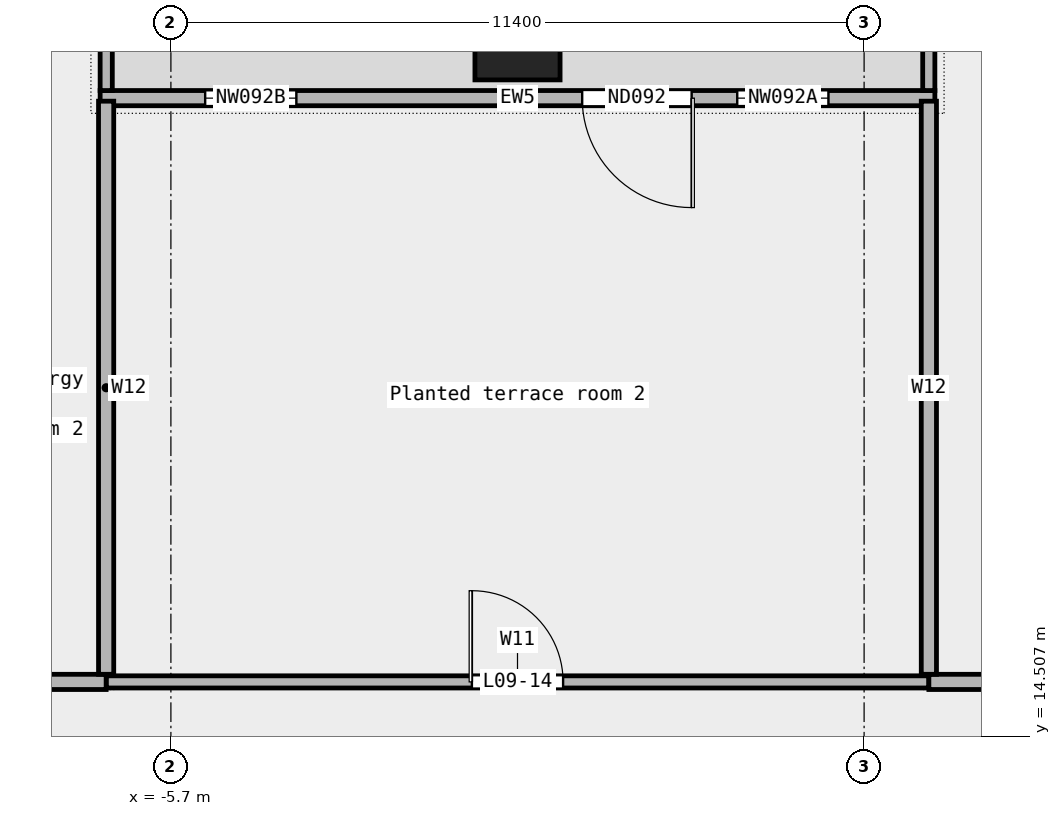
"""IFC4 building model, lengths in metres.
Left out: names, types, materials, properties, quantities, classifications, styles, units other than length and angle.
Written with IfcOpenShell. Run it as: python <this file> out.ifc"""

import sys

from ifc_helpers import new_model, si_unit, direction, frame, frame_2d, origin, origin_2d, place, context, subcontext, project, spatial, rectangle, extrude, element, fill, save


model = new_model("IFC4")
c1 = context("Model", 3, precision=1e-05, world=origin(), true_north=direction((0.0, 1.0)))
c2 = subcontext(c1, "Body", "Model", "MODEL_VIEW")
j1 = project(units=[si_unit("LENGTHUNIT", "METRE"), si_unit("PLANEANGLEUNIT", "RADIAN")], contexts=[c1])
p1 = place(None, origin())
s1 = spatial("IfcSite", under=j1, at=p1, CompositionType="ELEMENT")
p2 = place(p1, origin())
s2 = spatial("IfcBuilding", under=s1, at=p2, CompositionType="ELEMENT")
p3 = place(p2, frame((0.0, 0.0, 50.2)))
s3 = spatial("IfcBuildingStorey", under=s2, at=p3, CompositionType="ELEMENT", Elevation=50.2)
p4 = place(p3, frame((0.0, 26.0, 0.0), z_axis=(0.0, 0.0, 1.0), x_axis=(1.0, 0.0, 0.0)))
e1 = element("IfcColumn", 1, at=p4, inside=s3, PredefinedType="COLUMN", context=c2, shape_type="SweptSolid", body=[
    extrude(rectangle(XDim=1.4, YDim=1.4, at=origin_2d()), origin(), (0.0, 0.0, 1.0), 4.35),
])
p5 = place(p3, frame((6.864, 25.0, 0.0), z_axis=(0.0, 0.0, 1.0), x_axis=(-1.0, 0.0, 0.0)))
e2 = element("IfcWall", 2, at=p5, inside=s3, PredefinedType="STANDARD", context=c2, shape_type="SweptSolid", body=[
    extrude(rectangle(XDim=13.727, YDim=0.25, at=frame_2d((6.864, 0.0))), origin(), (0.0, 0.0, 1.0), 4.35),
])
p6 = place(p5, frame((1.75, 0.0, 0.45)))
e3 = element("IfcOpeningElement", 3, at=p6, cuts=e2, PredefinedType="OPENING", context=c2, shape_type="SweptSolid", body=[
    extrude(rectangle(XDim=1.5, YDim=3.0, at=frame_2d((0.75, 1.5))), frame((0.0, 0.137, 0.0), z_axis=(0.0, -1.0, 0.0), x_axis=(1.0, 0.0, 0.0)), (0.0, 0.0, 1.0), 0.274),
])
p7 = place(p5, frame((4.0, 0.0, 0.0)))
e4 = element("IfcOpeningElement", 4, at=p7, cuts=e2, PredefinedType="OPENING", context=c2, shape_type="SweptSolid", body=[
    extrude(rectangle(XDim=1.8, YDim=2.4, at=frame_2d((0.9, 1.2))), frame((0.0, 0.137, 0.0), z_axis=(0.0, -1.0, 0.0), x_axis=(1.0, 0.0, 0.0)), (0.0, 0.0, 1.0), 0.274),
])
p8 = place(p5, frame((10.5, 0.0, 0.45)))
e5 = element("IfcOpeningElement", 5, at=p8, cuts=e2, PredefinedType="OPENING", context=c2, shape_type="SweptSolid", body=[
    extrude(rectangle(XDim=1.5, YDim=3.0, at=frame_2d((0.75, 1.5))), frame((0.0, 0.137, 0.0), z_axis=(0.0, -1.0, 0.0), x_axis=(1.0, 0.0, 0.0)), (0.0, 0.0, 1.0), 0.274),
])
for number, where, z_axis, x_axis in (
    (6, (6.764, 27.0, 0.0), (0.0, 0.0, 1.0), (0.0, -1.0, 0.0)),
    (7, (-6.764, 27.0, 0.0), (0.0, 0.0, 1.0), (0.0, -1.0, 0.0)),
):
    element("IfcWall", number, at=place(p3, frame(where, z_axis=z_axis, x_axis=x_axis)), inside=s3, PredefinedType="STANDARD", context=c2, shape_type="SweptSolid", body=[
        extrude(rectangle(XDim=1.875, YDim=0.2, at=frame_2d((0.938, 0.0))), origin(), (0.0, 0.0, 1.0), 4.35),
    ])
p9 = place(p3, frame((-6.765, 15.4, 0.0), z_axis=(0.0, 0.0, 1.0), x_axis=(1.0, 0.0, 0.0)))
e8 = element("IfcWall", 8, at=p9, inside=s3, PredefinedType="PARTITIONING", context=c2, shape_type="SweptSolid", body=[
    extrude(rectangle(XDim=13.53, YDim=0.2, at=frame_2d((6.765, 0.0))), origin(), (0.0, 0.0, 1.0), 4.35),
])
p10 = place(p9, frame((6.015, 0.0, 0.0)))
e9 = element("IfcOpeningElement", 9, at=p10, cuts=e8, PredefinedType="OPENING", context=c2, shape_type="SweptSolid", body=[
    extrude(rectangle(XDim=1.5, YDim=2.1, at=frame_2d((0.75, 1.05))), frame((0.0, 0.112, 0.0), z_axis=(0.0, -1.0, 0.0), x_axis=(1.0, 0.0, 0.0)), (0.0, 0.0, 1.0), 0.224),
])
p11 = place(p3, frame((-10.185, 15.4, 0.0), z_axis=(0.0, 0.0, 1.0), x_axis=(1.0, 0.0, 0.0)))
e10 = element("IfcWall", 10, at=p11, inside=s3, PredefinedType="PARTITIONING", context=c2, shape_type="SweptSolid", body=[
    extrude(rectangle(XDim=3.42, YDim=0.25, at=frame_2d((1.71, 0.0))), origin(), (0.0, 0.0, 1.0), 4.35),
])
p12 = place(p11, frame((1.26, 0.0, 0.0)))
e11 = element("IfcOpeningElement", 11, at=p12, cuts=e10, PredefinedType="OPENING", context=c2, shape_type="SweptSolid", body=[
    extrude(rectangle(XDim=0.9, YDim=2.1, at=frame_2d((0.45, 1.05))), frame((0.0, 0.137, 0.0), z_axis=(0.0, -1.0, 0.0), x_axis=(1.0, 0.0, 0.0)), (0.0, 0.0, 1.0), 0.274),
])
p13 = place(p3, frame((6.765, 15.4, 0.0), z_axis=(0.0, 0.0, 1.0), x_axis=(1.0, 0.0, 0.0)))
e12 = element("IfcWall", 12, at=p13, inside=s3, PredefinedType="PARTITIONING", context=c2, shape_type="SweptSolid", body=[
    extrude(rectangle(XDim=9.535, YDim=0.25, at=frame_2d((4.768, 0.0))), origin(), (0.0, 0.0, 1.0), 4.35),
])
p14 = place(p13, frame((3.867, 0.0, 0.0)))
e13 = element("IfcOpeningElement", 13, at=p14, cuts=e12, PredefinedType="OPENING", context=c2, shape_type="SweptSolid", body=[
    extrude(rectangle(XDim=1.8, YDim=2.1, at=frame_2d((0.9, 1.05))), frame((0.0, 0.137, 0.0), z_axis=(0.0, -1.0, 0.0), x_axis=(1.0, 0.0, 0.0)), (0.0, 0.0, 1.0), 0.274),
])
for number, where, z_axis, x_axis in (
    (14, (-6.765, 15.525, 0.0), (0.0, 0.0, 1.0), (0.0, 1.0, 0.0)),
    (15, (6.765, 15.525, 0.0), (0.0, 0.0, 1.0), (0.0, 1.0, 0.0)),
):
    element("IfcWall", number, at=place(p3, frame(where, z_axis=z_axis, x_axis=x_axis)), inside=s3, PredefinedType="PARTITIONING", context=c2, shape_type="SweptSolid", body=[
        extrude(rectangle(XDim=9.425, YDim=0.25, at=frame_2d((4.712, 0.0))), origin(), (0.0, 0.0, 1.0), 4.35),
    ])
p15 = place(p6, origin())
e16 = element("IfcWindow", 16, at=p15, inside=s3, PartitioningType="SINGLE_PANEL", PredefinedType="WINDOW", context=c2, shape_type="SweptSolid", body=[
    extrude(rectangle(XDim=1.5, YDim=3.0, at=frame_2d((0.75, 1.5))), frame((0.0, 0.03, 0.0), z_axis=(0.0, -1.0, 0.0), x_axis=(1.0, 0.0, 0.0)), (0.0, 0.0, 1.0), 0.06),
])
fill(e3, e16)
p16 = place(p7, origin())
e17 = element("IfcDoor", 17, at=p16, inside=s3, OperationType="DOUBLE_DOOR_SINGLE_SWING", PredefinedType="DOOR", context=c2, shape_type="SweptSolid", body=[
    extrude(rectangle(XDim=1.8, YDim=2.4, at=frame_2d((0.9, 1.2))), frame((0.0, 0.025, 0.0), z_axis=(0.0, -1.0, 0.0), x_axis=(1.0, 0.0, 0.0)), (0.0, 0.0, 1.0), 0.05),
])
fill(e4, e17)
p17 = place(p8, origin())
e18 = element("IfcWindow", 18, at=p17, inside=s3, PartitioningType="SINGLE_PANEL", PredefinedType="WINDOW", context=c2, shape_type="SweptSolid", body=[
    extrude(rectangle(XDim=1.5, YDim=3.0, at=frame_2d((0.75, 1.5))), frame((0.0, 0.03, 0.0), z_axis=(0.0, -1.0, 0.0), x_axis=(1.0, 0.0, 0.0)), (0.0, 0.0, 1.0), 0.06),
])
fill(e5, e18)
p18 = place(p10, origin())
e19 = element("IfcDoor", 19, at=p18, inside=s3, OperationType="DOUBLE_DOOR_SINGLE_SWING", PredefinedType="DOOR", context=c2, shape_type="SweptSolid", body=[
    extrude(rectangle(XDim=1.5, YDim=2.1, at=frame_2d((0.75, 1.05))), frame((0.0, 0.025, 0.0), z_axis=(0.0, -1.0, 0.0), x_axis=(1.0, 0.0, 0.0)), (0.0, 0.0, 1.0), 0.05),
])
fill(e9, e19)
save(model, sys.argv[1])
